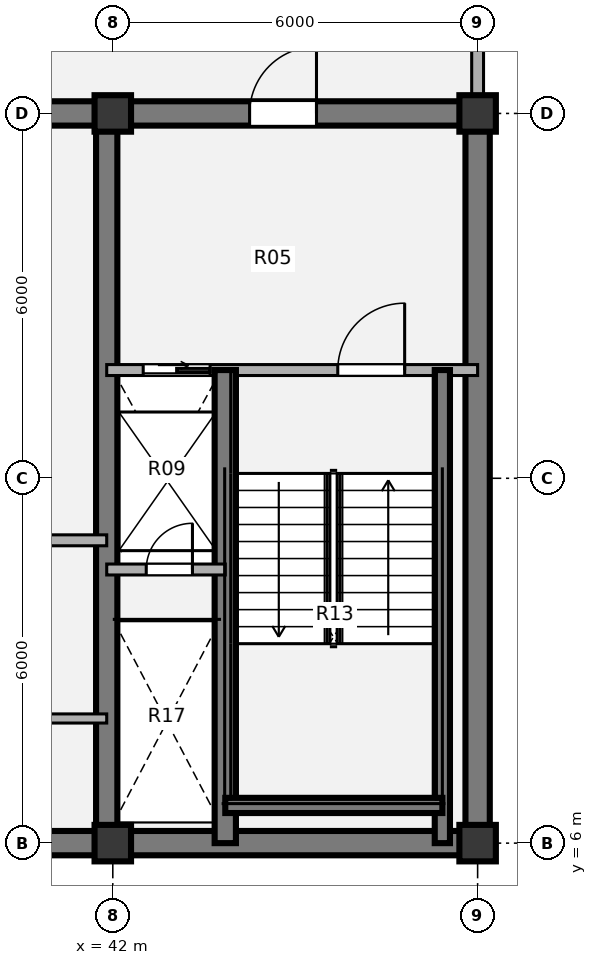
"""IFC4 building model, lengths in metres.
Left out: names, types, materials, properties, quantities, classifications, styles, units other than length and angle.
Written with IfcOpenShell. Run it as: python <this file> out.ifc"""

import sys

from ifc_helpers import new_model, si_unit, direction, frame, frame_2d, origin, origin_2d, place, context, subcontext, project, spatial, rectangle, extrude, source, transform, mapped, element, fill, save


model = new_model("IFC4")
c1 = context("Model", 3, precision=1e-05, world=origin(), true_north=direction((0.0, 1.0)))
c2 = subcontext(c1, "Body", "Model", "MODEL_VIEW")
j1 = project(units=[si_unit("LENGTHUNIT", "METRE"), si_unit("PLANEANGLEUNIT", "RADIAN")], contexts=[c1])
p1 = place(None, origin())
s1 = spatial("IfcSite", under=j1, at=p1, CompositionType="ELEMENT")
p2 = place(p1, origin())
s2 = spatial("IfcBuilding", under=s1, at=p2, CompositionType="ELEMENT")
p3 = place(p2, frame((0.0, 0.0, 311.76)))
s3 = spatial("IfcBuildingStorey", under=s2, at=p3, CompositionType="ELEMENT", Elevation=311.76)
m1 = source(origin(), c2, "Body", "SweptSolid", [
    extrude(rectangle(XDim=0.6, YDim=0.6, at=origin_2d()), origin(), (0.0, 0.0, 1.0), 3.96),
])
for number, where, z_axis, x_axis in (
    (1, (42.0, 6.0, 0.0), (0.0, 0.0, 1.0), (1.0, 0.0, 0.0)),
    (2, (48.0, 6.0, 0.0), (0.0, 0.0, 1.0), (1.0, 0.0, 0.0)),
    (3, (42.0, 18.0, 0.0), (0.0, 0.0, 1.0), (1.0, 0.0, 0.0)),
    (4, (48.0, 18.0, 0.0), (0.0, 0.0, 1.0), (1.0, 0.0, 0.0)),
):
    element("IfcColumn", number, at=place(p3, frame(where, z_axis=z_axis, x_axis=x_axis)), inside=s3, PredefinedType="COLUMN", context=c2, shape_type="MappedRepresentation", body=[
        mapped(m1, transform((0.0, 0.0, 0.0), x_axis=(1.0, 0.0, 0.0), y_axis=(0.0, 1.0, 0.0), z_axis=(0.0, 0.0, 1.0), scale=1.0)),
    ])
p4 = place(p3, frame((48.2, 6.0, 0.0), z_axis=(0.0, 0.0, 1.0), x_axis=(-1.0, 0.0, 0.0)))
e5 = element("IfcWall", 5, at=p4, inside=s3, PredefinedType="SHEAR", context=c2, shape_type="SweptSolid", body=[
    extrude(rectangle(XDim=24.4, YDim=0.4, at=frame_2d((12.2, 0.0))), origin(), (0.0, 0.0, 1.0), 3.96),
])
p5 = place(p3, frame((48.0, 18.0, 0.0), z_axis=(0.0, 0.0, 1.0), x_axis=(0.0, -1.0, 0.0)))
e6 = element("IfcWall", 6, at=p5, inside=s3, PredefinedType="SHEAR", context=c2, shape_type="SweptSolid", body=[
    extrude(rectangle(XDim=12.0, YDim=0.4, at=frame_2d((6.0, 0.0))), origin(), (0.0, 0.0, 1.0), 3.96),
])
p6 = place(p3, frame((38.8, 18.0, 0.0), z_axis=(0.0, 0.0, 1.0), x_axis=(1.0, 0.0, 0.0)))
e7 = element("IfcWall", 7, at=p6, inside=s3, PredefinedType="SHEAR", context=c2, shape_type="SweptSolid", body=[
    extrude(rectangle(XDim=9.4, YDim=0.4, at=frame_2d((4.7, 0.0))), origin(), (0.0, 0.0, 1.0), 3.96),
])
p7 = place(p6, frame((5.45, 0.0, 0.0)))
e8 = element("IfcOpeningElement", 8, at=p7, cuts=e7, PredefinedType="OPENING", context=c2, shape_type="SweptSolid", body=[
    extrude(rectangle(XDim=1.1, YDim=2.1, at=origin_2d()), frame((0.55, 0.21, 1.05), z_axis=(0.0, -1.0, 0.0), x_axis=(1.0, 0.0, 0.0)), (0.0, 0.0, 1.0), 0.42),
])
p8 = place(p3, frame((41.9, 18.0, 0.0), z_axis=(0.0, 0.0, 1.0), x_axis=(0.0, -1.0, 0.0)))
e9 = element("IfcWall", 9, at=p8, inside=s3, PredefinedType="SHEAR", context=c2, shape_type="SweptSolid", body=[
    extrude(rectangle(XDim=12.0, YDim=0.35, at=frame_2d((6.0, 0.0))), origin(), (0.0, 0.0, 1.0), 3.96),
])
p9 = place(p3, frame((48.0, 21.05, 0.0), z_axis=(0.0, 0.0, 1.0), x_axis=(0.0, -1.0, 0.0)))
e10 = element("IfcWall", 10, at=p9, inside=s3, PredefinedType="SOLIDWALL", context=c2, shape_type="SweptSolid", body=[
    extrude(rectangle(XDim=2.77, YDim=0.195, at=frame_2d((1.385, 0.0))), origin(), (0.0, 0.0, 1.0), 2.898),
])
p10 = place(p3, frame((38.0, 8.05, 0.0), z_axis=(0.0, 0.0, 1.0), x_axis=(1.0, 0.0, 0.0)))
e11 = element("IfcWall", 11, at=p10, inside=s3, PredefinedType="PARTITIONING", context=c2, shape_type="SweptSolid", body=[
    extrude(rectangle(XDim=3.9, YDim=0.15, at=frame_2d((1.95, 0.0))), origin(), (0.0, 0.0, 1.0), 3.68),
])
p11 = place(p10, frame((1.45, 0.0, 0.0)))
e12 = element("IfcOpeningElement", 12, at=p11, cuts=e11, PredefinedType="OPENING", context=c2, shape_type="SweptSolid", body=[
    extrude(rectangle(XDim=0.86, YDim=2.1, at=origin_2d()), frame((0.43, 0.085, 1.05), z_axis=(0.0, -1.0, 0.0), x_axis=(1.0, 0.0, 0.0)), (0.0, 0.0, 1.0), 0.17),
])
p12 = place(p3, frame((38.0, 10.98, 0.0), z_axis=(0.0, 0.0, 1.0), x_axis=(1.0, 0.0, 0.0)))
e13 = element("IfcWall", 13, at=p12, inside=s3, PredefinedType="PARTITIONING", context=c2, shape_type="SweptSolid", body=[
    extrude(rectangle(XDim=3.9, YDim=0.18, at=frame_2d((1.95, 0.0))), origin(), (0.0, 0.0, 1.0), 3.68),
])
p13 = place(p3, frame((41.9, 13.78, 0.0), z_axis=(0.0, 0.0, 1.0), x_axis=(1.0, 0.0, 0.0)))
e14 = element("IfcWall", 14, at=p13, inside=s3, PredefinedType="PARTITIONING", context=c2, shape_type="SweptSolid", body=[
    extrude(rectangle(XDim=6.1, YDim=0.18, at=frame_2d((3.05, 0.0))), origin(), (0.0, 0.0, 1.0), 3.68),
])
p14 = place(p13, frame((0.6, 0.0, 0.0)))
e15 = element("IfcOpeningElement", 15, at=p14, cuts=e14, PredefinedType="OPENING", context=c2, shape_type="SweptSolid", body=[
    extrude(rectangle(XDim=1.1, YDim=2.1, at=origin_2d()), frame((0.55, 0.1, 1.05), z_axis=(0.0, -1.0, 0.0), x_axis=(1.0, 0.0, 0.0)), (0.0, 0.0, 1.0), 0.2),
])
p15 = place(p13, frame((3.8, 0.0, 0.0)))
e16 = element("IfcOpeningElement", 16, at=p15, cuts=e14, PredefinedType="OPENING", context=c2, shape_type="SweptSolid", body=[
    extrude(rectangle(XDim=1.1, YDim=2.1, at=origin_2d()), frame((0.55, 0.1, 1.05), z_axis=(0.0, -1.0, 0.0), x_axis=(1.0, 0.0, 0.0)), (0.0, 0.0, 1.0), 0.2),
])
p16 = place(p3, frame((43.85, 6.0, 0.0), z_axis=(0.0, 0.0, 1.0), x_axis=(0.0, 1.0, 0.0)))
e17 = element("IfcWall", 17, at=p16, inside=s3, PredefinedType="SHEAR", context=c2, shape_type="SweptSolid", body=[
    extrude(rectangle(XDim=7.78, YDim=0.35, at=frame_2d((3.89, 0.0))), origin(), (0.0, 0.0, 1.0), 4.03),
])
p17 = place(p3, frame((47.42, 6.0, 0.0), z_axis=(0.0, 0.0, 1.0), x_axis=(0.0, 1.0, 0.0)))
e18 = element("IfcWall", 18, at=p17, inside=s3, PredefinedType="SHEAR", context=c2, shape_type="SweptSolid", body=[
    extrude(rectangle(XDim=7.78, YDim=0.25, at=frame_2d((3.89, 0.0))), origin(), (0.0, 0.0, 1.0), 4.03),
])
p18 = place(p3, frame((43.85, 6.62, 0.0), z_axis=(0.0, 0.0, 1.0), x_axis=(1.0, 0.0, 0.0)))
e19 = element("IfcWall", 19, at=p18, inside=s3, PredefinedType="SHEAR", context=c2, shape_type="SweptSolid", body=[
    extrude(rectangle(XDim=3.57, YDim=0.25, at=frame_2d((1.785, 0.0))), origin(), (0.0, 0.0, 1.0), 4.03),
])
p19 = place(p3, frame((41.9, 10.5, 0.0), z_axis=(0.0, 0.0, 1.0), x_axis=(1.0, 0.0, 0.0)))
e20 = element("IfcWall", 20, at=p19, inside=s3, PredefinedType="PARTITIONING", context=c2, shape_type="SweptSolid", body=[
    extrude(rectangle(XDim=1.95, YDim=0.18, at=frame_2d((0.975, 0.0))), origin(), (0.0, 0.0, 1.0), 3.68),
])
p20 = place(p19, frame((0.65, 0.0, 0.0)))
e21 = element("IfcOpeningElement", 21, at=p20, cuts=e20, PredefinedType="OPENING", context=c2, shape_type="SweptSolid", body=[
    extrude(rectangle(XDim=0.76, YDim=2.05, at=origin_2d()), frame((0.38, 0.1, 1.025), z_axis=(0.0, -1.0, 0.0), x_axis=(1.0, 0.0, 0.0)), (0.0, 0.0, 1.0), 0.2),
])
m2 = source(origin(), c2, "Body", "SweptSolid", [
    extrude(rectangle(XDim=1.1, YDim=2.1, at=origin_2d()), frame((0.55, 0.025, 1.05), z_axis=(0.0, -1.0, 0.0), x_axis=(1.0, 0.0, 0.0)), (0.0, 0.0, 1.0), 0.05),
])
p21 = place(p14, origin())
e22 = element("IfcDoor", 22, at=p21, inside=s3, OperationType="SLIDING_TO_RIGHT", PredefinedType="DOOR", context=c2, shape_type="MappedRepresentation", body=[
    mapped(m2, transform((0.0, 0.0, 0.0), x_axis=(1.0, 0.0, 0.0), y_axis=(0.0, 1.0, 0.0), z_axis=(0.0, 0.0, 1.0), scale=1.0)),
])
fill(e15, e22)
m3 = source(origin(), c2, "Body", "SweptSolid", [
    extrude(rectangle(XDim=1.1, YDim=2.1, at=origin_2d()), frame((0.55, 0.025, 1.05), z_axis=(0.0, -1.0, 0.0), x_axis=(1.0, 0.0, 0.0)), (0.0, 0.0, 1.0), 0.05),
])
p22 = place(p15, origin())
e23 = element("IfcDoor", 23, at=p22, inside=s3, OperationType="SINGLE_SWING_RIGHT", PredefinedType="DOOR", context=c2, shape_type="MappedRepresentation", body=[
    mapped(m3, transform((0.0, 0.0, 0.0), x_axis=(1.0, 0.0, 0.0), y_axis=(0.0, 1.0, 0.0), z_axis=(0.0, 0.0, 1.0), scale=1.0)),
])
fill(e16, e23)
m4 = source(origin(), c2, "Body", "SweptSolid", [
    extrude(rectangle(XDim=0.76, YDim=2.05, at=origin_2d()), frame((0.38, 0.025, 1.025), z_axis=(0.0, -1.0, 0.0), x_axis=(1.0, 0.0, 0.0)), (0.0, 0.0, 1.0), 0.05),
])
p23 = place(p20, origin())
e24 = element("IfcDoor", 24, at=p23, inside=s3, OperationType="SINGLE_SWING_RIGHT", PredefinedType="DOOR", context=c2, shape_type="MappedRepresentation", body=[
    mapped(m4, transform((0.0, 0.0, 0.0), x_axis=(1.0, 0.0, 0.0), y_axis=(0.0, 1.0, 0.0), z_axis=(0.0, 0.0, 1.0), scale=1.0)),
])
fill(e21, e24)
m5 = source(origin(), c2, "Body", "SweptSolid", [
    extrude(rectangle(XDim=1.1, YDim=2.1, at=origin_2d()), frame((0.55, 0.025, 1.05), z_axis=(0.0, -1.0, 0.0), x_axis=(1.0, 0.0, 0.0)), (0.0, 0.0, 1.0), 0.05),
])
p24 = place(p7, origin())
e25 = element("IfcDoor", 25, at=p24, inside=s3, OperationType="SINGLE_SWING_RIGHT", PredefinedType="DOOR", context=c2, shape_type="MappedRepresentation", body=[
    mapped(m5, transform((0.0, 0.0, 0.0), x_axis=(1.0, 0.0, 0.0), y_axis=(0.0, 1.0, 0.0), z_axis=(0.0, 0.0, 1.0), scale=1.0)),
])
fill(e8, e25)
save(model, sys.argv[1])
